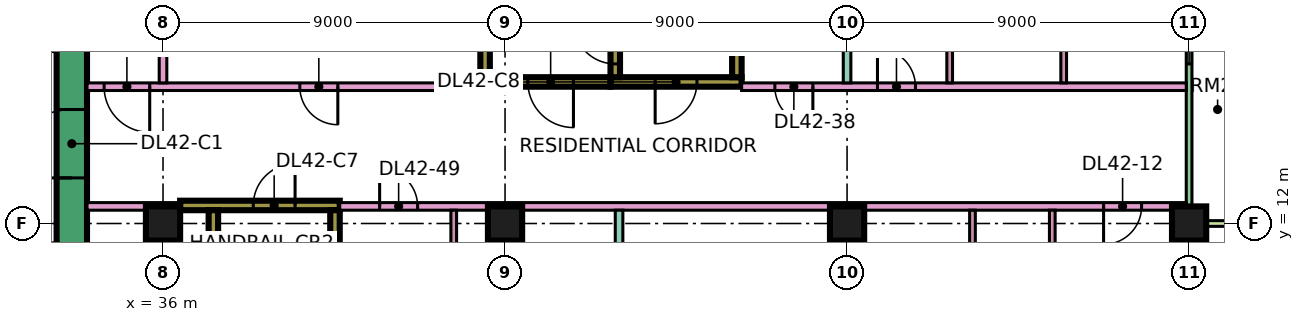
"""IFC4 building model, lengths in metres.
Left out: names, types, materials, properties, quantities, classifications, styles, units other than length and angle.
Written with IfcOpenShell. Run it as: python <this file> out.ifc"""

import sys

from ifc_helpers import new_model, si_unit, direction, frame, frame_2d, origin, origin_2d, place, context, subcontext, project, spatial, rectangle, extrude, element, fill, save


model = new_model("IFC4")
c1 = context("Model", 3, precision=1e-05, world=origin(), true_north=direction((0.0, 1.0)))
c2 = subcontext(c1, "Body", "Model", "MODEL_VIEW")
j1 = project(units=[si_unit("LENGTHUNIT", "METRE"), si_unit("PLANEANGLEUNIT", "RADIAN")], contexts=[c1])
p1 = place(None, origin())
s1 = spatial("IfcSite", under=j1, at=p1, CompositionType="ELEMENT")
p2 = place(p1, origin())
s2 = spatial("IfcBuilding", under=s1, at=p2, CompositionType="ELEMENT")
p3 = place(p2, frame((0.0, 0.0, 183.65)))
s3 = spatial("IfcBuildingStorey", under=s2, at=p3, CompositionType="ELEMENT", Elevation=183.65)
for number, where, z_axis, x_axis in (
    (1, (36.0, 12.0, 0.0), (0.0, 0.0, 1.0), (1.0, 0.0, 0.0)),
    (2, (45.0, 12.0, 0.0), (0.0, 0.0, 1.0), (1.0, 0.0, 0.0)),
    (3, (54.0, 12.0, 0.0), (0.0, 0.0, 1.0), (1.0, 0.0, 0.0)),
    (4, (63.0, 12.0, 0.0), (0.0, 0.0, 1.0), (1.0, 0.0, 0.0)),
):
    element("IfcColumn", number, at=place(p3, frame(where, z_axis=z_axis, x_axis=x_axis)), inside=s3, PredefinedType="COLUMN", context=c2, shape_type="SweptSolid", body=[
        extrude(rectangle(XDim=0.9, YDim=0.9, at=origin_2d()), origin(), (0.0, 0.0, 1.0), 3.75),
    ])
p4 = place(p3, frame((33.6, 7.8, 0.0), z_axis=(0.0, 0.0, 1.0), x_axis=(0.0, 1.0, 0.0)))
e5 = element("IfcWall", 5, at=p4, inside=s3, PredefinedType="SHEAR", context=c2, shape_type="SweptSolid", body=[
    extrude(rectangle(XDim=11.4, YDim=0.8, at=frame_2d((5.7, 0.0))), origin(), (0.0, 0.0, 1.0), 3.75),
])
p5 = place(p4, frame((5.4, 0.0, 0.0)))
e6 = element("IfcOpeningElement", 6, at=p5, cuts=e5, PredefinedType="OPENING", context=c2, shape_type="SweptSolid", body=[
    extrude(rectangle(XDim=1.8, YDim=2.4, at=frame_2d((0.9, 1.2))), frame((0.0, 0.41, 0.0), z_axis=(0.0, -1.0, 0.0), x_axis=(1.0, 0.0, 0.0)), (0.0, 0.0, 1.0), 0.82),
])
p6 = place(p3, frame((36.45, 12.475, 0.0), z_axis=(0.0, 0.0, 1.0), x_axis=(1.0, 0.0, 0.0)))
e7 = element("IfcWall", 7, at=p6, inside=s3, PredefinedType="SHEAR", context=c2, shape_type="SweptSolid", body=[
    extrude(rectangle(XDim=4.2, YDim=0.25, at=frame_2d((2.1, 0.0))), origin(), (0.0, 0.0, 1.0), 3.75),
])
p7 = place(p6, frame((1.925, 0.0, 0.0)))
e8 = element("IfcOpeningElement", 8, at=p7, cuts=e7, PredefinedType="OPENING", context=c2, shape_type="SweptSolid", body=[
    extrude(rectangle(XDim=1.1, YDim=2.2, at=frame_2d((0.55, 1.1))), frame((0.0, 0.135, 0.0), z_axis=(0.0, -1.0, 0.0), x_axis=(1.0, 0.0, 0.0)), (0.0, 0.0, 1.0), 0.27),
])
for number, where, z_axis, x_axis in (
    (9, (37.325, 5.85, 0.0), (0.0, 0.0, 1.0), (0.0, 1.0, 0.0)),
    (10, (40.525, 5.85, 0.0), (0.0, 0.0, 1.0), (0.0, 1.0, 0.0)),
):
    element("IfcWall", number, at=place(p3, frame(where, z_axis=z_axis, x_axis=x_axis)), inside=s3, PredefinedType="SHEAR", context=c2, shape_type="SweptSolid", body=[
        extrude(rectangle(XDim=6.5, YDim=0.25, at=frame_2d((3.25, 0.0))), origin(), (0.0, 0.0, 1.0), 3.75),
    ])
p8 = place(p3, frame((47.775, 15.725, 0.0), z_axis=(0.0, 0.0, 1.0), x_axis=(1.0, 0.0, 0.0)))
e11 = element("IfcWall", 11, at=p8, inside=s3, PredefinedType="SHEAR", context=c2, shape_type="SweptSolid", body=[
    extrude(rectangle(XDim=3.45, YDim=0.25, at=frame_2d((1.725, 0.0))), origin(), (0.0, 0.0, 1.0), 3.75),
])
p9 = place(p8, frame((1.175, 0.0, 0.0)))
e12 = element("IfcOpeningElement", 12, at=p9, cuts=e11, PredefinedType="OPENING", context=c2, shape_type="SweptSolid", body=[
    extrude(rectangle(XDim=1.1, YDim=2.2, at=frame_2d((0.55, 1.1))), frame((0.0, 0.135, 0.0), z_axis=(0.0, -1.0, 0.0), x_axis=(1.0, 0.0, 0.0)), (0.0, 0.0, 1.0), 0.27),
])
p10 = place(p3, frame((47.9, 15.85, 0.0), z_axis=(0.0, 0.0, 1.0), x_axis=(0.0, 1.0, 0.0)))
e13 = element("IfcWall", 13, at=p10, inside=s3, PredefinedType="SHEAR", context=c2, shape_type="SweptSolid", body=[
    extrude(rectangle(XDim=6.5, YDim=0.25, at=frame_2d((3.25, 0.0))), origin(), (0.0, 0.0, 1.0), 3.75),
])
p11 = place(p10, frame((0.35, 0.0, 0.0)))
e14 = element("IfcOpeningElement", 14, at=p11, cuts=e13, PredefinedType="OPENING", context=c2, shape_type="SweptSolid", body=[
    extrude(rectangle(XDim=1.1, YDim=2.2, at=frame_2d((0.55, 1.1))), frame((0.0, 0.135, 0.0), z_axis=(0.0, -1.0, 0.0), x_axis=(1.0, 0.0, 0.0)), (0.0, 0.0, 1.0), 0.27),
])
p12 = place(p3, frame((51.1, 15.85, 0.0), z_axis=(0.0, 0.0, 1.0), x_axis=(0.0, 1.0, 0.0)))
e15 = element("IfcWall", 15, at=p12, inside=s3, PredefinedType="SHEAR", context=c2, shape_type="SweptSolid", body=[
    extrude(rectangle(XDim=6.5, YDim=0.25, at=frame_2d((3.25, 0.0))), origin(), (0.0, 0.0, 1.0), 3.75),
])
p13 = place(p3, frame((44.35, 15.725, 0.0), z_axis=(0.0, 0.0, 1.0), x_axis=(1.0, 0.0, 0.0)))
e16 = element("IfcWall", 16, at=p13, inside=s3, PredefinedType="SHEAR", context=c2, shape_type="SweptSolid", body=[
    extrude(rectangle(XDim=3.425, YDim=0.25, at=frame_2d((1.712, 0.0))), origin(), (0.0, 0.0, 1.0), 3.75),
])
p14 = place(p13, frame((1.25, 0.0, 0.0)))
e17 = element("IfcOpeningElement", 17, at=p14, cuts=e16, PredefinedType="OPENING", context=c2, shape_type="SweptSolid", body=[
    extrude(rectangle(XDim=1.2, YDim=2.2, at=frame_2d((0.6, 1.1))), frame((0.0, 0.135, 0.0), z_axis=(0.0, -1.0, 0.0), x_axis=(1.0, 0.0, 0.0)), (0.0, 0.0, 1.0), 0.27),
])
p15 = place(p3, frame((44.475, 15.85, 0.0), z_axis=(0.0, 0.0, 1.0), x_axis=(0.0, 1.0, 0.0)))
e18 = element("IfcWall", 18, at=p15, inside=s3, PredefinedType="SHEAR", context=c2, shape_type="SweptSolid", body=[
    extrude(rectangle(XDim=6.5, YDim=0.25, at=frame_2d((3.25, 0.0))), origin(), (0.0, 0.0, 1.0), 3.75),
])
p16 = place(p15, frame((1.75, 0.0, 0.0)))
e19 = element("IfcOpeningElement", 19, at=p16, cuts=e18, PredefinedType="OPENING", context=c2, shape_type="SweptSolid", body=[
    extrude(rectangle(XDim=1.1, YDim=2.2, at=frame_2d((0.55, 1.1))), frame((0.0, 0.135, 0.0), z_axis=(0.0, -1.0, 0.0), x_axis=(1.0, 0.0, 0.0)), (0.0, 0.0, 1.0), 0.27),
])
p17 = place(p15, frame((4.3, 0.0, 0.0)))
e20 = element("IfcOpeningElement", 20, at=p17, cuts=e18, PredefinedType="OPENING", context=c2, shape_type="SweptSolid", body=[
    extrude(rectangle(XDim=1.1, YDim=2.2, at=frame_2d((0.55, 1.1))), frame((0.0, 0.135, 0.0), z_axis=(0.0, -1.0, 0.0), x_axis=(1.0, 0.0, 0.0)), (0.0, 0.0, 1.0), 0.27),
])
p18 = place(p3, frame((63.0, 12.075, 0.0), z_axis=(0.0, 0.0, 1.0), x_axis=(0.0, 1.0, 0.0)))
e21 = element("IfcWall", 21, at=p18, inside=s3, PredefinedType="SOLIDWALL", context=c2, shape_type="SweptSolid", body=[
    extrude(rectangle(XDim=10.35, YDim=0.15, at=frame_2d((5.175, 0.0))), origin(), (0.0, 0.0, 1.0), 3.35),
])
p19 = place(p18, frame((4.125, 0.0, 0.45)))
e22 = element("IfcOpeningElement", 22, at=p19, cuts=e21, PredefinedType="OPENING", context=c2, shape_type="SweptSolid", body=[
    extrude(rectangle(XDim=1.8, YDim=2.4, at=frame_2d((0.9, 1.2))), frame((0.0, 0.085, 0.0), z_axis=(0.0, -1.0, 0.0), x_axis=(1.0, 0.0, 0.0)), (0.0, 0.0, 1.0), 0.17),
])
p20 = place(p18, frame((7.538, 0.0, 0.0)))
e23 = element("IfcOpeningElement", 23, at=p20, cuts=e21, PredefinedType="OPENING", context=c2, shape_type="SweptSolid", body=[
    extrude(rectangle(XDim=1.8, YDim=2.4, at=frame_2d((0.9, 1.2))), frame((0.0, 0.085, 0.0), z_axis=(0.0, -1.0, 0.0), x_axis=(1.0, 0.0, 0.0)), (0.0, 0.0, 1.0), 0.17),
])
p21 = place(p3, frame((64.5, 12.0, 0.0), z_axis=(0.0, 0.0, 1.0), x_axis=(-1.0, 0.0, 0.0)))
e24 = element("IfcWall", 24, at=p21, inside=s3, PredefinedType="SOLIDWALL", context=c2, shape_type="SweptSolid", body=[
    extrude(rectangle(XDim=1.5, YDim=0.15, at=frame_2d((0.75, 0.0))), origin(), (0.0, 0.0, 1.0), 3.35),
])
p22 = place(p3, frame((34.0, 12.45, 0.0), z_axis=(0.0, 0.0, 1.0), x_axis=(1.0, 0.0, 0.0)))
e25 = element("IfcWall", 25, at=p22, inside=s3, PredefinedType="PARTITIONING", context=c2, shape_type="SweptSolid", body=[
    extrude(rectangle(XDim=2.451, YDim=0.2, at=frame_2d((1.226, 0.0))), origin(), (0.0, 0.0, 1.0), 3.35),
])
p23 = place(p3, frame((34.0, 15.6, 0.0), z_axis=(0.0, 0.0, 1.0), x_axis=(1.0, 0.0, 0.0)))
e26 = element("IfcWall", 26, at=p23, inside=s3, PredefinedType="PARTITIONING", context=c2, shape_type="SweptSolid", body=[
    extrude(rectangle(XDim=10.35, YDim=0.2, at=frame_2d((5.175, 0.0))), origin(), (0.0, 0.0, 1.0), 3.35),
])
p24 = place(p23, frame((5.6, 0.0, 0.0)))
e27 = element("IfcOpeningElement", 27, at=p24, cuts=e26, PredefinedType="OPENING", context=c2, shape_type="SweptSolid", body=[
    extrude(rectangle(XDim=1.0, YDim=2.1, at=frame_2d((0.5, 1.05))), frame((0.0, 0.11, 0.0), z_axis=(0.0, -1.0, 0.0), x_axis=(1.0, 0.0, 0.0)), (0.0, 0.0, 1.0), 0.22),
])
p25 = place(p23, frame((0.45, 0.0, 0.0)))
e28 = element("IfcOpeningElement", 28, at=p25, cuts=e26, PredefinedType="OPENING", context=c2, shape_type="SweptSolid", body=[
    extrude(rectangle(XDim=1.2, YDim=2.1, at=frame_2d((0.6, 1.05))), frame((0.0, 0.11, 0.0), z_axis=(0.0, -1.0, 0.0), x_axis=(1.0, 0.0, 0.0)), (0.0, 0.0, 1.0), 0.22),
])
p26 = place(p3, frame((36.0, 15.7, 0.0), z_axis=(0.0, 0.0, 1.0), x_axis=(0.0, 1.0, 0.0)))
e29 = element("IfcWall", 29, at=p26, inside=s3, PredefinedType="PARTITIONING", context=c2, shape_type="SweptSolid", body=[
    extrude(rectangle(XDim=8.3, YDim=0.2, at=frame_2d((4.15, 0.0))), origin(), (0.0, 0.0, 1.0), 3.35),
])
p27 = place(p3, frame((40.65, 12.45, 0.0), z_axis=(0.0, 0.0, 1.0), x_axis=(1.0, 0.0, 0.0)))
e30 = element("IfcWall", 30, at=p27, inside=s3, PredefinedType="PARTITIONING", context=c2, shape_type="SweptSolid", body=[
    extrude(rectangle(XDim=22.276, YDim=0.2, at=frame_2d((11.138, 0.0))), origin(), (0.0, 0.0, 1.0), 3.35),
])
p28 = place(p27, frame((20.1, 0.0, 0.0)))
e31 = element("IfcOpeningElement", 31, at=p28, cuts=e30, PredefinedType="OPENING", context=c2, shape_type="SweptSolid", body=[
    extrude(rectangle(XDim=1.0, YDim=2.1, at=frame_2d((0.5, 1.05))), frame((0.0, 0.11, 0.0), z_axis=(0.0, -1.0, 0.0), x_axis=(1.0, 0.0, 0.0)), (0.0, 0.0, 1.0), 0.22),
])
p29 = place(p27, frame((1.05, 0.0, 0.0)))
e32 = element("IfcOpeningElement", 32, at=p29, cuts=e30, PredefinedType="OPENING", context=c2, shape_type="SweptSolid", body=[
    extrude(rectangle(XDim=1.0, YDim=2.1, at=frame_2d((0.5, 1.05))), frame((0.0, 0.11, 0.0), z_axis=(0.0, -1.0, 0.0), x_axis=(1.0, 0.0, 0.0)), (0.0, 0.0, 1.0), 0.22),
])
p30 = place(p3, frame((43.65, 5.825, 0.0), z_axis=(0.0, 0.0, 1.0), x_axis=(0.0, 1.0, 0.0)))
e33 = element("IfcWall", 33, at=p30, inside=s3, PredefinedType="PARTITIONING", context=c2, shape_type="SweptSolid", body=[
    extrude(rectangle(XDim=6.525, YDim=0.15, at=frame_2d((3.263, 0.0))), origin(), (0.0, 0.0, 1.0), 3.35),
])
p31 = place(p30, frame((4.425, 0.0, 0.0)))
e34 = element("IfcOpeningElement", 34, at=p31, cuts=e33, PredefinedType="OPENING", context=c2, shape_type="SweptSolid", body=[
    extrude(rectangle(XDim=0.9, YDim=2.1, at=frame_2d((0.45, 1.05))), frame((0.0, 0.085, 0.0), z_axis=(0.0, -1.0, 0.0), x_axis=(1.0, 0.0, 0.0)), (0.0, 0.0, 1.0), 0.17),
])
p32 = place(p3, frame((48.0, 5.825, 0.0), z_axis=(0.0, 0.0, 1.0), x_axis=(0.0, 1.0, 0.0)))
e35 = element("IfcWall", 35, at=p32, inside=s3, PredefinedType="PARTITIONING", context=c2, shape_type="SweptSolid", body=[
    extrude(rectangle(XDim=6.525, YDim=0.2, at=frame_2d((3.263, 0.0))), origin(), (0.0, 0.0, 1.0), 3.35),
])
p33 = place(p3, frame((51.225, 15.6, 0.0), z_axis=(0.0, 0.0, 1.0), x_axis=(1.0, 0.0, 0.0)))
e36 = element("IfcWall", 36, at=p33, inside=s3, PredefinedType="PARTITIONING", context=c2, shape_type="SweptSolid", body=[
    extrude(rectangle(XDim=11.701, YDim=0.2, at=frame_2d((5.851, 0.0))), origin(), (0.0, 0.0, 1.0), 3.35),
])
p34 = place(p33, frame((3.575, 0.0, 0.0)))
e37 = element("IfcOpeningElement", 37, at=p34, cuts=e36, PredefinedType="OPENING", context=c2, shape_type="SweptSolid", body=[
    extrude(rectangle(XDim=1.0, YDim=2.1, at=frame_2d((0.5, 1.05))), frame((0.0, 0.11, 0.0), z_axis=(0.0, -1.0, 0.0), x_axis=(1.0, 0.0, 0.0)), (0.0, 0.0, 1.0), 0.22),
])
p35 = place(p33, frame((0.875, 0.0, 0.0)))
e38 = element("IfcOpeningElement", 38, at=p35, cuts=e36, PredefinedType="OPENING", context=c2, shape_type="SweptSolid", body=[
    extrude(rectangle(XDim=1.0, YDim=2.1, at=frame_2d((0.5, 1.05))), frame((0.0, 0.11, 0.0), z_axis=(0.0, -1.0, 0.0), x_axis=(1.0, 0.0, 0.0)), (0.0, 0.0, 1.0), 0.22),
])
p36 = place(p3, frame((54.0, 7.125, 0.0), z_axis=(0.0, 0.0, 1.0), x_axis=(0.0, 1.0, 0.0)))
e39 = element("IfcWall", 39, at=p36, inside=s3, PredefinedType="PARTITIONING", context=c2, shape_type="SweptSolid", body=[
    extrude(rectangle(XDim=5.225, YDim=0.15, at=frame_2d((2.613, 0.0))), origin(), (0.0, 0.0, 1.0), 3.35),
])
p37 = place(p3, frame((54.0, 15.7, 0.0), z_axis=(0.0, 0.0, 1.0), x_axis=(0.0, 1.0, 0.0)))
e40 = element("IfcWall", 40, at=p37, inside=s3, PredefinedType="PARTITIONING", context=c2, shape_type="SweptSolid", body=[
    extrude(rectangle(XDim=8.3, YDim=0.2, at=frame_2d((4.15, 0.0))), origin(), (0.0, 0.0, 1.0), 3.35),
])
p38 = place(p3, frame((56.7, 15.7, 0.0), z_axis=(0.0, 0.0, 1.0), x_axis=(0.0, 1.0, 0.0)))
e41 = element("IfcWall", 41, at=p38, inside=s3, PredefinedType="PARTITIONING", context=c2, shape_type="SweptSolid", body=[
    extrude(rectangle(XDim=2.825, YDim=0.15, at=frame_2d((1.413, 0.0))), origin(), (0.0, 0.0, 1.0), 3.35),
])
for number, where, z_axis, x_axis in (
    (42, (57.3, 7.125, 0.0), (0.0, 0.0, 1.0), (0.0, 1.0, 0.0)),
    (43, (59.4, 7.125, 0.0), (0.0, 0.0, 1.0), (0.0, 1.0, 0.0)),
):
    element("IfcWall", number, at=place(p3, frame(where, z_axis=z_axis, x_axis=x_axis)), inside=s3, PredefinedType="PARTITIONING", context=c2, shape_type="SweptSolid", body=[
        extrude(rectangle(XDim=5.225, YDim=0.15, at=frame_2d((2.613, 0.0))), origin(), (0.0, 0.0, 1.0), 3.35),
    ])
p39 = place(p3, frame((59.7, 15.7, 0.0), z_axis=(0.0, 0.0, 1.0), x_axis=(0.0, 1.0, 0.0)))
e44 = element("IfcWall", 44, at=p39, inside=s3, PredefinedType="PARTITIONING", context=c2, shape_type="SweptSolid", body=[
    extrude(rectangle(XDim=2.825, YDim=0.15, at=frame_2d((1.413, 0.0))), origin(), (0.0, 0.0, 1.0), 3.35),
])
p40 = place(p19, origin())
e45 = element("IfcWindow", 45, at=p40, inside=s3, PartitioningType="SINGLE_PANEL", PredefinedType="WINDOW", context=c2, shape_type="SweptSolid", body=[
    extrude(rectangle(XDim=1.8, YDim=2.4, at=frame_2d((0.9, 1.2))), frame((0.0, 0.03, 0.0), z_axis=(0.0, -1.0, 0.0), x_axis=(1.0, 0.0, 0.0)), (0.0, 0.0, 1.0), 0.06),
])
fill(e22, e45)
p41 = place(p5, origin())
e46 = element("IfcDoor", 46, at=p41, inside=s3, OperationType="DOUBLE_DOOR_SINGLE_SWING", PredefinedType="DOOR", context=c2, shape_type="SweptSolid", body=[
    extrude(rectangle(XDim=1.8, YDim=2.4, at=frame_2d((0.9, 1.2))), frame((0.0, 0.025, 0.0), z_axis=(0.0, -1.0, 0.0), x_axis=(1.0, 0.0, 0.0)), (0.0, 0.0, 1.0), 0.05),
])
fill(e6, e46)
p42 = place(p7, frame((1.1, 0.0, 0.0), z_axis=(0.0, 0.0, 1.0), x_axis=(-1.0, 0.0, 0.0)))
e47 = element("IfcDoor", 47, at=p42, inside=s3, OperationType="SINGLE_SWING_RIGHT", PredefinedType="DOOR", context=c2, shape_type="SweptSolid", body=[
    extrude(rectangle(XDim=1.1, YDim=2.2, at=frame_2d((0.55, 1.1))), frame((0.0, 0.025, 0.0), z_axis=(0.0, -1.0, 0.0), x_axis=(1.0, 0.0, 0.0)), (0.0, 0.0, 1.0), 0.05),
])
fill(e8, e47)
p43 = place(p9, frame((1.1, 0.0, 0.0), z_axis=(0.0, 0.0, 1.0), x_axis=(-1.0, 0.0, 0.0)))
e48 = element("IfcDoor", 48, at=p43, inside=s3, OperationType="SINGLE_SWING_LEFT", PredefinedType="DOOR", context=c2, shape_type="SweptSolid", body=[
    extrude(rectangle(XDim=1.1, YDim=2.2, at=frame_2d((0.55, 1.1))), frame((0.0, 0.025, 0.0), z_axis=(0.0, -1.0, 0.0), x_axis=(1.0, 0.0, 0.0)), (0.0, 0.0, 1.0), 0.05),
])
fill(e12, e48)
p44 = place(p14, origin())
e49 = element("IfcDoor", 49, at=p44, inside=s3, OperationType="SINGLE_SWING_RIGHT", PredefinedType="DOOR", context=c2, shape_type="SweptSolid", body=[
    extrude(rectangle(XDim=1.2, YDim=2.2, at=frame_2d((0.6, 1.1))), frame((0.0, 0.025, 0.0), z_axis=(0.0, -1.0, 0.0), x_axis=(1.0, 0.0, 0.0)), (0.0, 0.0, 1.0), 0.05),
])
fill(e17, e49)
p45 = place(p11, frame((1.1, 0.0, 0.0), z_axis=(0.0, 0.0, 1.0), x_axis=(-1.0, 0.0, 0.0)))
e50 = element("IfcDoor", 50, at=p45, inside=s3, OperationType="SINGLE_SWING_RIGHT", PredefinedType="DOOR", context=c2, shape_type="SweptSolid", body=[
    extrude(rectangle(XDim=1.1, YDim=2.2, at=frame_2d((0.55, 1.1))), frame((0.0, 0.025, 0.0), z_axis=(0.0, -1.0, 0.0), x_axis=(1.0, 0.0, 0.0)), (0.0, 0.0, 1.0), 0.05),
])
fill(e14, e50)
p46 = place(p24, origin())
e51 = element("IfcDoor", 51, at=p46, inside=s3, OperationType="SINGLE_SWING_RIGHT", PredefinedType="DOOR", context=c2, shape_type="SweptSolid", body=[
    extrude(rectangle(XDim=1.0, YDim=2.1, at=frame_2d((0.5, 1.05))), frame((0.0, 0.025, 0.0), z_axis=(0.0, -1.0, 0.0), x_axis=(1.0, 0.0, 0.0)), (0.0, 0.0, 1.0), 0.05),
])
fill(e27, e51)
p47 = place(p34, origin())
e52 = element("IfcDoor", 52, at=p47, inside=s3, OperationType="SINGLE_SWING_LEFT", PredefinedType="DOOR", context=c2, shape_type="SweptSolid", body=[
    extrude(rectangle(XDim=1.0, YDim=2.1, at=frame_2d((0.5, 1.05))), frame((0.0, 0.025, 0.0), z_axis=(0.0, -1.0, 0.0), x_axis=(1.0, 0.0, 0.0)), (0.0, 0.0, 1.0), 0.05),
])
fill(e37, e52)
p48 = place(p28, frame((1.0, 0.0, 0.0), z_axis=(0.0, 0.0, 1.0), x_axis=(-1.0, 0.0, 0.0)))
e53 = element("IfcDoor", 53, at=p48, inside=s3, OperationType="SINGLE_SWING_LEFT", PredefinedType="DOOR", context=c2, shape_type="SweptSolid", body=[
    extrude(rectangle(XDim=1.0, YDim=2.1, at=frame_2d((0.5, 1.05))), frame((0.0, 0.025, 0.0), z_axis=(0.0, -1.0, 0.0), x_axis=(1.0, 0.0, 0.0)), (0.0, 0.0, 1.0), 0.05),
])
fill(e31, e53)
p49 = place(p25, origin())
e54 = element("IfcDoor", 54, at=p49, inside=s3, OperationType="SINGLE_SWING_RIGHT", PredefinedType="DOOR", context=c2, shape_type="SweptSolid", body=[
    extrude(rectangle(XDim=1.2, YDim=2.1, at=frame_2d((0.6, 1.05))), frame((0.0, 0.025, 0.0), z_axis=(0.0, -1.0, 0.0), x_axis=(1.0, 0.0, 0.0)), (0.0, 0.0, 1.0), 0.05),
])
fill(e28, e54)
p50 = place(p35, origin())
e55 = element("IfcDoor", 55, at=p50, inside=s3, OperationType="SINGLE_SWING_RIGHT", PredefinedType="DOOR", context=c2, shape_type="SweptSolid", body=[
    extrude(rectangle(XDim=1.0, YDim=2.1, at=frame_2d((0.5, 1.05))), frame((0.0, 0.025, 0.0), z_axis=(0.0, -1.0, 0.0), x_axis=(1.0, 0.0, 0.0)), (0.0, 0.0, 1.0), 0.05),
])
fill(e38, e55)
p51 = place(p29, origin())
e56 = element("IfcDoor", 56, at=p51, inside=s3, OperationType="SINGLE_SWING_LEFT", PredefinedType="DOOR", context=c2, shape_type="SweptSolid", body=[
    extrude(rectangle(XDim=1.0, YDim=2.1, at=frame_2d((0.5, 1.05))), frame((0.0, 0.025, 0.0), z_axis=(0.0, -1.0, 0.0), x_axis=(1.0, 0.0, 0.0)), (0.0, 0.0, 1.0), 0.05),
])
fill(e32, e56)
save(model, sys.argv[1])
